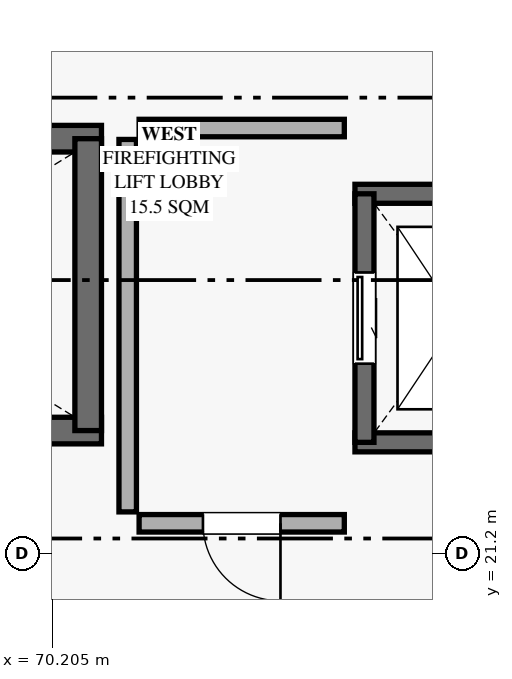
"""IFC4 building model, lengths in metres.
Left out: names, types, materials, properties, quantities, classifications, styles, units other than length and angle.
Written with IfcOpenShell. Run it as: python <this file> out.ifc"""

import sys

from ifc_helpers import new_model, si_unit, direction, frame, frame_2d, origin, place, context, subcontext, project, spatial, rectangle, extrude, element, fill, save


model = new_model("IFC4")
c1 = context("Model", 3, precision=1e-05, world=origin(), true_north=direction((0.0, 1.0)))
c2 = subcontext(c1, "Body", "Model", "MODEL_VIEW")
j1 = project(units=[si_unit("LENGTHUNIT", "METRE"), si_unit("PLANEANGLEUNIT", "RADIAN")], contexts=[c1])
p1 = place(None, origin())
s1 = spatial("IfcSite", under=j1, at=p1, CompositionType="ELEMENT")
p2 = place(p1, origin())
s2 = spatial("IfcBuilding", under=s1, at=p2, CompositionType="ELEMENT")
p3 = place(p2, origin())
s3 = spatial("IfcBuildingStorey", under=s2, at=p3, CompositionType="ELEMENT", Elevation=0.0)
for number, where, z_axis, x_axis in (
    (1, (70.855, 22.82, 0.0), (0.0, 0.0, 1.0), (-1.0, 0.0, 0.0)),
    (2, (62.845, 26.66, 0.0), (0.0, 0.0, 1.0), (1.0, 0.0, 0.0)),
):
    element("IfcWall", number, at=place(p3, frame(where, z_axis=z_axis, x_axis=x_axis)), inside=s3, PredefinedType="SHEAR", context=c2, shape_type="SweptSolid", body=[
        extrude(rectangle(XDim=8.01, YDim=0.35, at=frame_2d((4.005, 0.0))), origin(), (0.0, 0.0, 1.0), 5.13),
    ])
p4 = place(p3, frame((70.68, 26.66, 0.0), z_axis=(0.0, 0.0, 1.0), x_axis=(0.0, -1.0, 0.0)))
e3 = element("IfcWall", 3, at=p4, inside=s3, PredefinedType="SHEAR", context=c2, shape_type="SweptSolid", body=[
    extrude(rectangle(XDim=3.84, YDim=0.35, at=frame_2d((1.92, 0.0))), origin(), (0.0, 0.0, 1.0), 5.13),
])
for number, where, z_axis, x_axis in (
    (4, (76.91, 22.665, 0.0), (0.0, 0.0, 1.0), (-1.0, 0.0, 0.0)),
    (5, (74.19, 25.935, 0.0), (0.0, 0.0, 1.0), (1.0, 0.0, 0.0)),
):
    element("IfcWall", number, at=place(p3, frame(where, z_axis=z_axis, x_axis=x_axis)), inside=s3, PredefinedType="SHEAR", context=c2, shape_type="SweptSolid", body=[
        extrude(rectangle(XDim=2.72, YDim=0.25, at=frame_2d((1.36, 0.0))), origin(), (0.0, 0.0, 1.0), 5.13),
    ])
p5 = place(p3, frame((74.315, 22.665, 0.0), z_axis=(0.0, 0.0, 1.0), x_axis=(0.0, 1.0, 0.0)))
e6 = element("IfcWall", 6, at=p5, inside=s3, PredefinedType="SHEAR", context=c2, shape_type="SweptSolid", body=[
    extrude(rectangle(XDim=3.27, YDim=0.25, at=frame_2d((1.635, 0.0))), origin(), (0.0, 0.0, 1.0), 5.13),
])
p6 = place(p5, frame((1.035, 0.0, 0.0)))
e7 = element("IfcOpeningElement", 7, at=p6, cuts=e6, PredefinedType="OPENING", context=c2, shape_type="SweptSolid", body=[
    extrude(rectangle(XDim=1.2, YDim=2.25, at=frame_2d((0.6, 1.125))), frame((0.0, 0.135, 0.0), z_axis=(0.0, -1.0, 0.0), x_axis=(1.0, 0.0, 0.0)), (0.0, 0.0, 1.0), 0.27),
])
p7 = place(p3, frame((74.05, 21.6, 0.0), z_axis=(0.0, 0.0, 1.0), x_axis=(-1.0, 0.0, 0.0)))
e8 = element("IfcWall", 8, at=p7, inside=s3, PredefinedType="PARTITIONING", context=c2, shape_type="SweptSolid", body=[
    extrude(rectangle(XDim=2.7, YDim=0.23, at=frame_2d((1.35, 0.0))), origin(), (0.0, 0.0, 1.0), 3.88),
])
p8 = place(p7, frame((0.84, 0.0, 0.0)))
e9 = element("IfcOpeningElement", 9, at=p8, cuts=e8, PredefinedType="OPENING", context=c2, shape_type="SweptSolid", body=[
    extrude(rectangle(XDim=1.02, YDim=2.12, at=frame_2d((0.51, 1.06))), frame((0.0, 0.125, 0.0), z_axis=(0.0, -1.0, 0.0), x_axis=(1.0, 0.0, 0.0)), (0.0, 0.0, 1.0), 0.25),
])
p9 = place(p3, frame((71.35, 26.8, 0.0), z_axis=(0.0, 0.0, 1.0), x_axis=(1.0, 0.0, 0.0)))
e10 = element("IfcWall", 10, at=p9, inside=s3, PredefinedType="PARTITIONING", context=c2, shape_type="SweptSolid", body=[
    extrude(rectangle(XDim=2.7, YDim=0.23, at=frame_2d((1.35, 0.0))), origin(), (0.0, 0.0, 1.0), 3.88),
])
p10 = place(p3, frame((71.2, 21.75, 0.0), z_axis=(0.0, 0.0, 1.0), x_axis=(0.0, 1.0, 0.0)))
e11 = element("IfcWall", 11, at=p10, inside=s3, PredefinedType="PARTITIONING", context=c2, shape_type="SweptSolid", body=[
    extrude(rectangle(XDim=4.9, YDim=0.23, at=frame_2d((2.45, 0.0))), origin(), (0.0, 0.0, 1.0), 3.88),
])
p11 = place(p6, origin())
e12 = element("IfcDoor", 12, at=p11, inside=s3, OperationType="SLIDING_TO_LEFT", PredefinedType="DOOR", context=c2, shape_type="SweptSolid", body=[
    extrude(rectangle(XDim=1.2, YDim=2.25, at=frame_2d((0.6, 1.125))), frame((0.0, 0.025, 0.0), z_axis=(0.0, -1.0, 0.0), x_axis=(1.0, 0.0, 0.0)), (0.0, 0.0, 1.0), 0.05),
])
fill(e7, e12)
p12 = place(p8, origin())
e13 = element("IfcDoor", 13, at=p12, inside=s3, OperationType="SINGLE_SWING_LEFT", PredefinedType="DOOR", context=c2, shape_type="SweptSolid", body=[
    extrude(rectangle(XDim=1.02, YDim=2.12, at=frame_2d((0.51, 1.06))), frame((0.0, 0.025, 0.0), z_axis=(0.0, -1.0, 0.0), x_axis=(1.0, 0.0, 0.0)), (0.0, 0.0, 1.0), 0.05),
])
fill(e9, e13)
save(model, sys.argv[1])
